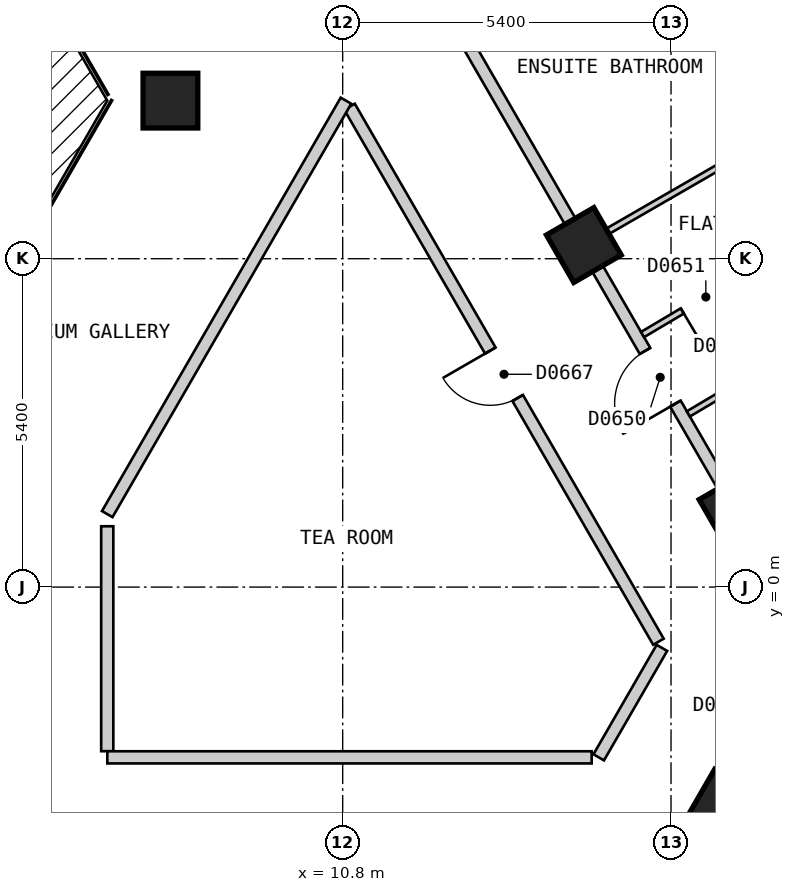
"""IFC4 building model, lengths in metres.
Left out: names, types, materials, properties, quantities, classifications, styles, units other than length and angle.
Written with IfcOpenShell. Run it as: python <this file> out.ifc"""

import sys

from ifc_helpers import new_model, si_unit, direction, frame, frame_2d, origin, origin_2d, place, context, subcontext, project, spatial, polyline, rectangle, outline, extrude, element, fill, save


model = new_model("IFC4")
c1 = context("Model", 3, precision=1e-05, world=origin(), true_north=direction((0.0, 1.0)))
c2 = subcontext(c1, "Body", "Model", "MODEL_VIEW")
j1 = project(units=[si_unit("LENGTHUNIT", "METRE"), si_unit("PLANEANGLEUNIT", "RADIAN")], contexts=[c1])
p1 = place(None, origin())
s1 = spatial("IfcSite", under=j1, at=p1, CompositionType="ELEMENT")
p2 = place(p1, origin())
s2 = spatial("IfcBuilding", under=s1, at=p2, CompositionType="ELEMENT")
p3 = place(p2, frame((0.0, 0.0, 81.0)))
s3 = spatial("IfcBuildingStorey", under=s2, at=p3, CompositionType="ELEMENT", Elevation=81.0)
for number, where, z_axis, x_axis in (
    (1, (17.083, -3.612, 0.0), (0.0, 0.0, 1.0), (0.5, 0.866, 0.0)),
    (2, (17.278, 1.274, 0.0), (0.0, 0.0, 1.0), (-0.5, 0.866, 0.0)),
    (3, (14.766, 5.625, 0.0), (0.0, 0.0, 1.0), (-0.5, 0.866, 0.0)),
    (4, (7.967, 8.0, 0.0), (0.0, 0.0, 1.0), (1.0, 0.0, 0.0)),
):
    element("IfcColumn", number, at=place(p3, frame(where, z_axis=z_axis, x_axis=x_axis)), inside=s3, PredefinedType="COLUMN", context=c2, shape_type="SweptSolid", body=[
        extrude(rectangle(XDim=0.9, YDim=0.9, at=origin_2d()), origin(), (0.0, 0.0, 1.0), 3.0),
    ])
p4 = place(p3, frame((29.027, 1.425, 0.0), z_axis=(0.0, 0.0, 1.0), x_axis=(-0.500027479704, 0.866009537788, 0.0)))
e5 = element("IfcWall", 5, at=p4, inside=s3, PredefinedType="SOLIDWALL", context=c2, shape_type="SweptSolid", body=[
    extrude(outline(polyline([(0.0, -0.15), (26.559, -0.15), (26.478, 0.15), (0.08, 0.15), (0.0, -0.15)])), origin(), (0.0, 0.0, 1.0), 2.7),
])
p5 = place(p4, frame((1.227, 0.0, 0.15)))
e6 = element("IfcOpeningElement", 6, at=p5, cuts=e5, PredefinedType="OPENING", context=c2, shape_type="SweptSolid", body=[
    extrude(rectangle(XDim=1.5, YDim=2.1, at=frame_2d((0.75, 1.05))), frame((0.0, 0.16, 0.0), z_axis=(0.0, -1.0, 0.0), x_axis=(1.0, 0.0, 0.0)), (0.0, 0.0, 1.0), 0.32),
])
p6 = place(p4, frame((3.738, 0.0, 0.15)))
e7 = element("IfcOpeningElement", 7, at=p6, cuts=e5, PredefinedType="OPENING", context=c2, shape_type="SweptSolid", body=[
    extrude(rectangle(XDim=1.5, YDim=2.1, at=frame_2d((0.75, 1.05))), frame((0.0, 0.16, 0.0), z_axis=(0.0, -1.0, 0.0), x_axis=(1.0, 0.0, 0.0)), (0.0, 0.0, 1.0), 0.32),
])
p7 = place(p4, frame((6.25, 0.0, 0.15)))
e8 = element("IfcOpeningElement", 8, at=p7, cuts=e5, PredefinedType="OPENING", context=c2, shape_type="SweptSolid", body=[
    extrude(rectangle(XDim=1.5, YDim=2.1, at=frame_2d((0.75, 1.05))), frame((0.0, 0.16, 0.0), z_axis=(0.0, -1.0, 0.0), x_axis=(1.0, 0.0, 0.0)), (0.0, 0.0, 1.0), 0.32),
])
p8 = place(p4, frame((8.761, 0.0, 0.15)))
e9 = element("IfcOpeningElement", 9, at=p8, cuts=e5, PredefinedType="OPENING", context=c2, shape_type="SweptSolid", body=[
    extrude(rectangle(XDim=1.5, YDim=2.1, at=frame_2d((0.75, 1.05))), frame((0.0, 0.16, 0.0), z_axis=(0.0, -1.0, 0.0), x_axis=(1.0, 0.0, 0.0)), (0.0, 0.0, 1.0), 0.32),
])
p9 = place(p4, frame((11.273, 0.0, 0.15)))
e10 = element("IfcOpeningElement", 10, at=p9, cuts=e5, PredefinedType="OPENING", context=c2, shape_type="SweptSolid", body=[
    extrude(rectangle(XDim=1.5, YDim=2.1, at=frame_2d((0.75, 1.05))), frame((0.0, 0.16, 0.0), z_axis=(0.0, -1.0, 0.0), x_axis=(1.0, 0.0, 0.0)), (0.0, 0.0, 1.0), 0.32),
])
p10 = place(p4, frame((13.785, 0.0, 0.15)))
e11 = element("IfcOpeningElement", 11, at=p10, cuts=e5, PredefinedType="OPENING", context=c2, shape_type="SweptSolid", body=[
    extrude(rectangle(XDim=1.5, YDim=2.1, at=frame_2d((0.75, 1.05))), frame((0.0, 0.16, 0.0), z_axis=(0.0, -1.0, 0.0), x_axis=(1.0, 0.0, 0.0)), (0.0, 0.0, 1.0), 0.32),
])
p11 = place(p4, frame((16.296, 0.0, 0.15)))
e12 = element("IfcOpeningElement", 12, at=p11, cuts=e5, PredefinedType="OPENING", context=c2, shape_type="SweptSolid", body=[
    extrude(rectangle(XDim=1.5, YDim=2.1, at=frame_2d((0.75, 1.05))), frame((0.0, 0.16, 0.0), z_axis=(0.0, -1.0, 0.0), x_axis=(1.0, 0.0, 0.0)), (0.0, 0.0, 1.0), 0.32),
])
p12 = place(p4, frame((18.807, 0.0, 0.15)))
e13 = element("IfcOpeningElement", 13, at=p12, cuts=e5, PredefinedType="OPENING", context=c2, shape_type="SweptSolid", body=[
    extrude(rectangle(XDim=1.5, YDim=2.1, at=frame_2d((0.75, 1.05))), frame((0.0, 0.16, 0.0), z_axis=(0.0, -1.0, 0.0), x_axis=(1.0, 0.0, 0.0)), (0.0, 0.0, 1.0), 0.32),
])
p13 = place(p4, frame((21.319, 0.0, 0.15)))
e14 = element("IfcOpeningElement", 14, at=p13, cuts=e5, PredefinedType="OPENING", context=c2, shape_type="SweptSolid", body=[
    extrude(rectangle(XDim=1.5, YDim=2.1, at=frame_2d((0.75, 1.05))), frame((0.0, 0.16, 0.0), z_axis=(0.0, -1.0, 0.0), x_axis=(1.0, 0.0, 0.0)), (0.0, 0.0, 1.0), 0.32),
])
p14 = place(p4, frame((23.831, 0.0, 0.15)))
e15 = element("IfcOpeningElement", 15, at=p14, cuts=e5, PredefinedType="OPENING", context=c2, shape_type="SweptSolid", body=[
    extrude(rectangle(XDim=1.5, YDim=2.1, at=frame_2d((0.75, 1.05))), frame((0.0, 0.16, 0.0), z_axis=(0.0, -1.0, 0.0), x_axis=(1.0, 0.0, 0.0)), (0.0, 0.0, 1.0), 0.32),
])
p15 = place(p3, frame((10.913, 7.899, 0.0), z_axis=(0.0, 0.0, 1.0), x_axis=(0.500028940566, -0.866008694296, 0.0)))
e16 = element("IfcWall", 16, at=p15, inside=s3, PredefinedType="PARTITIONING", context=c2, shape_type="SweptSolid", body=[
    extrude(rectangle(XDim=10.159, YDim=0.2, at=frame_2d((5.08, 0.0))), origin(), (0.0, 0.0, 1.0), 2.7),
])
p16 = place(p15, frame((4.63, 0.0, 0.0)))
e17 = element("IfcOpeningElement", 17, at=p16, cuts=e16, PredefinedType="OPENING", context=c2, shape_type="SweptSolid", body=[
    extrude(rectangle(XDim=0.9, YDim=2.1, at=frame_2d((0.45, 1.05))), frame((0.0, 0.11, 0.0), z_axis=(0.0, -1.0, 0.0), x_axis=(1.0, 0.0, 0.0)), (0.0, 0.0, 1.0), 0.22),
])
p17 = place(p3, frame((8.488, 16.5, 0.0), z_axis=(0.0, 0.0, 1.0), x_axis=(0.499986836607, -0.86603300354, 0.0)))
e18 = element("IfcWall", 18, at=p17, inside=s3, PredefinedType="PARTITIONING", context=c2, shape_type="SweptSolid", body=[
    extrude(rectangle(XDim=20.09, YDim=0.2, at=frame_2d((10.045, 0.0))), origin(), (0.0, 0.0, 1.0), 2.7),
])
p18 = place(p17, frame((14.569, 0.0, 0.0)))
e19 = element("IfcOpeningElement", 19, at=p18, cuts=e18, PredefinedType="OPENING", context=c2, shape_type="SweptSolid", body=[
    extrude(rectangle(XDim=1.0, YDim=2.1, at=frame_2d((0.5, 1.05))), frame((0.0, 0.11, 0.0), z_axis=(0.0, -1.0, 0.0), x_axis=(1.0, 0.0, 0.0)), (0.0, 0.0, 1.0), 0.22),
])
p19 = place(p3, frame((6.928, 1.0, 0.0), z_axis=(0.0, 0.0, 1.0), x_axis=(0.0, -1.0, 0.0)))
e20 = element("IfcWall", 20, at=p19, inside=s3, PredefinedType="PARTITIONING", context=c2, shape_type="SweptSolid", body=[
    extrude(rectangle(XDim=3.699, YDim=0.2, at=frame_2d((1.85, 0.0))), origin(), (0.0, 0.0, 1.0), 2.7),
])
p20 = place(p3, frame((6.929, -2.8, 0.0), z_axis=(0.0, 0.0, 1.0), x_axis=(1.0, 0.0, 0.0)))
e21 = element("IfcWall", 21, at=p20, inside=s3, PredefinedType="PARTITIONING", context=c2, shape_type="SweptSolid", body=[
    extrude(rectangle(XDim=7.966, YDim=0.2, at=frame_2d((3.983, 0.0))), origin(), (0.0, 0.0, 1.0), 2.7),
])
p21 = place(p3, frame((6.928, 1.2, 0.0), z_axis=(0.0, 0.0, 1.0), x_axis=(0.500055327065, 0.865993458332, 0.0)))
e22 = element("IfcWall", 22, at=p21, inside=s3, PredefinedType="PARTITIONING", context=c2, shape_type="SweptSolid", body=[
    extrude(rectangle(XDim=7.851, YDim=0.2, at=frame_2d((3.926, 0.0))), origin(), (0.0, 0.0, 1.0), 2.7),
])
p22 = place(p3, frame((15.011, -2.8, 0.0), z_axis=(0.0, 0.0, 1.0), x_axis=(0.499929208183, 0.866066271601, 0.0)))
e23 = element("IfcWall", 23, at=p22, inside=s3, PredefinedType="PARTITIONING", context=c2, shape_type="SweptSolid", body=[
    extrude(rectangle(XDim=2.078, YDim=0.2, at=frame_2d((1.039, 0.0))), origin(), (0.0, 0.0, 1.0), 2.7),
])
p23 = place(p3, frame((15.771, -5.884, 0.0), z_axis=(0.0, 0.0, 1.0), x_axis=(0.499939494019, 0.866060334111, 0.0)))
e24 = element("IfcWall", 24, at=p23, inside=s3, PredefinedType="PARTITIONING", context=c2, shape_type="SweptSolid", body=[
    extrude(rectangle(XDim=5.583, YDim=0.2, at=frame_2d((2.792, 0.0))), origin(), (0.0, 0.0, 1.0), 2.7),
])
p24 = place(p23, frame((4.03, 0.0, 0.0)))
e25 = element("IfcOpeningElement", 25, at=p24, cuts=e24, PredefinedType="OPENING", context=c2, shape_type="SweptSolid", body=[
    extrude(rectangle(XDim=1.0, YDim=2.1, at=frame_2d((0.5, 1.05))), frame((0.0, 0.11, 0.0), z_axis=(0.0, -1.0, 0.0), x_axis=(1.0, 0.0, 0.0)), (0.0, 0.0, 1.0), 0.22),
])
p25 = place(p3, frame((14.853, 5.675, 0.0), z_axis=(0.0, 0.0, 1.0), x_axis=(0.866016855193, 0.500014806302, 0.0)))
e26 = element("IfcWall", 26, at=p25, inside=s3, PredefinedType="PARTITIONING", context=c2, shape_type="SweptSolid", body=[
    extrude(rectangle(XDim=10.0, YDim=0.1, at=frame_2d((5.0, 0.0))), origin(), (0.0, 0.0, 1.0), 2.7),
])
p26 = place(p25, frame((4.775, 0.0, 0.0)))
e27 = element("IfcOpeningElement", 27, at=p26, cuts=e26, PredefinedType="OPENING", context=c2, shape_type="SweptSolid", body=[
    extrude(rectangle(XDim=0.9, YDim=2.1, at=frame_2d((0.45, 1.05))), frame((0.0, 0.06, 0.0), z_axis=(0.0, -1.0, 0.0), x_axis=(1.0, 0.0, 0.0)), (0.0, 0.0, 1.0), 0.12),
])
p27 = place(p3, frame((15.732, 4.153, 0.0), z_axis=(0.0, 0.0, 1.0), x_axis=(0.859987631152, 0.510314877566, 0.0)))
e28 = element("IfcWall", 28, at=p27, inside=s3, PredefinedType="PARTITIONING", context=c2, shape_type="SweptSolid", body=[
    extrude(rectangle(XDim=2.52, YDim=0.1, at=frame_2d((1.26, 0.0))), origin(), (0.0, 0.0, 1.0), 2.7),
])
p28 = place(p27, frame((0.76, 0.0, 0.0)))
e29 = element("IfcOpeningElement", 29, at=p28, cuts=e28, PredefinedType="OPENING", context=c2, shape_type="SweptSolid", body=[
    extrude(rectangle(XDim=0.9, YDim=2.1, at=frame_2d((0.45, 1.05))), frame((0.0, 0.06, 0.0), z_axis=(0.0, -1.0, 0.0), x_axis=(1.0, 0.0, 0.0)), (0.0, 0.0, 1.0), 0.12),
])
p29 = place(p3, frame((16.485, 2.848, 0.0), z_axis=(0.0, 0.0, 1.0), x_axis=(0.860052465539, 0.510205602205, 0.0)))
e30 = element("IfcWall", 30, at=p29, inside=s3, PredefinedType="PARTITIONING", context=c2, shape_type="SweptSolid", body=[
    extrude(rectangle(XDim=2.489, YDim=0.1, at=frame_2d((1.245, 0.0))), origin(), (0.0, 0.0, 1.0), 2.7),
])
p30 = place(p29, frame((0.819, 0.0, 0.0)))
e31 = element("IfcOpeningElement", 31, at=p30, cuts=e30, PredefinedType="OPENING", context=c2, shape_type="SweptSolid", body=[
    extrude(rectangle(XDim=0.8, YDim=2.1, at=frame_2d((0.4, 1.05))), frame((0.0, 0.06, 0.0), z_axis=(0.0, -1.0, 0.0), x_axis=(1.0, 0.0, 0.0)), (0.0, 0.0, 1.0), 0.12),
])
p31 = place(p3, frame((15.372, 11.775, 0.0), z_axis=(0.0, 0.0, 1.0), x_axis=(0.500035488351, -0.866004913606, 0.0)))
e32 = element("IfcWall", 32, at=p31, inside=s3, PredefinedType="PARTITIONING", context=c2, shape_type="SweptSolid", body=[
    extrude(rectangle(XDim=4.973, YDim=0.1, at=frame_2d((2.487, 0.0))), origin(), (0.0, 0.0, 1.0), 2.7),
])
p32 = place(p31, frame((2.112, 0.0, 0.0)))
e33 = element("IfcOpeningElement", 33, at=p32, cuts=e32, PredefinedType="OPENING", context=c2, shape_type="SweptSolid", body=[
    extrude(rectangle(XDim=0.8, YDim=2.1, at=frame_2d((0.4, 1.05))), frame((0.0, 0.06, 0.0), z_axis=(0.0, -1.0, 0.0), x_axis=(1.0, 0.0, 0.0)), (0.0, 0.0, 1.0), 0.12),
])
p33 = place(p18, origin())
e34 = element("IfcDoor", 34, at=p33, inside=s3, OperationType="SINGLE_SWING_RIGHT", PredefinedType="DOOR", context=c2, shape_type="SweptSolid", body=[
    extrude(rectangle(XDim=1.0, YDim=2.1, at=frame_2d((0.5, 1.05))), frame((0.0, 0.025, 0.0), z_axis=(0.0, -1.0, 0.0), x_axis=(1.0, 0.0, 0.0)), (0.0, 0.0, 1.0), 0.05),
])
fill(e19, e34)
p34 = place(p28, origin())
e35 = element("IfcDoor", 35, at=p34, inside=s3, OperationType="SINGLE_SWING_LEFT", PredefinedType="DOOR", context=c2, shape_type="SweptSolid", body=[
    extrude(rectangle(XDim=0.9, YDim=2.1, at=frame_2d((0.45, 1.05))), frame((0.0, 0.025, 0.0), z_axis=(0.0, -1.0, 0.0), x_axis=(1.0, 0.0, 0.0)), (0.0, 0.0, 1.0), 0.05),
])
fill(e29, e35)
p35 = place(p16, origin())
e36 = element("IfcDoor", 36, at=p35, inside=s3, OperationType="SINGLE_SWING_LEFT", PredefinedType="DOOR", context=c2, shape_type="SweptSolid", body=[
    extrude(rectangle(XDim=0.9, YDim=2.1, at=frame_2d((0.45, 1.05))), frame((0.0, 0.025, 0.0), z_axis=(0.0, -1.0, 0.0), x_axis=(1.0, 0.0, 0.0)), (0.0, 0.0, 1.0), 0.05),
])
fill(e17, e36)
save(model, sys.argv[1])
